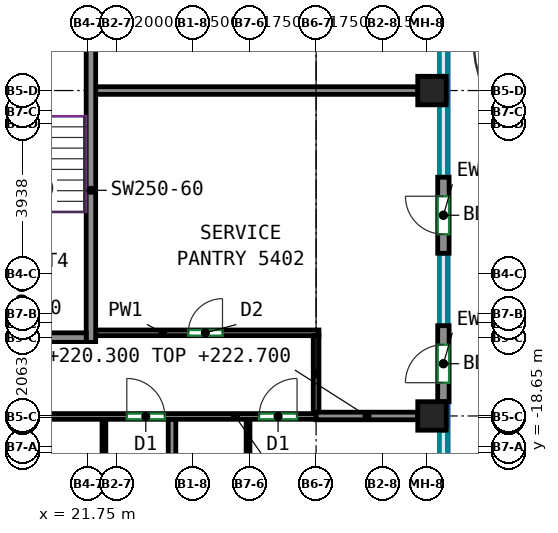
"""IFC4 building model, lengths in metres.
Left out: names, types, materials, properties, quantities, classifications, styles, units other than length and angle.
Written with IfcOpenShell. Run it as: python <this file> out.ifc"""

import sys

from ifc_helpers import new_model, si_unit, direction, frame, frame_2d, origin, origin_2d, place, context, subcontext, project, spatial, rectangle, extrude, source, transform, mapped, element, fill, save


model = new_model("IFC4")
c1 = context("Model", 3, precision=1e-05, world=origin(), true_north=direction((0.0, 1.0)))
c2 = subcontext(c1, "Body", "Model", "MODEL_VIEW")
j1 = project(units=[si_unit("LENGTHUNIT", "METRE"), si_unit("PLANEANGLEUNIT", "RADIAN")], contexts=[c1])
p1 = place(None, origin())
s1 = spatial("IfcSite", under=j1, at=p1, CompositionType="ELEMENT")
p2 = place(p1, origin())
s2 = spatial("IfcBuilding", under=s1, at=p2, CompositionType="ELEMENT")
p3 = place(p2, frame((0.0, 0.0, 220.3)))
s3 = spatial("IfcBuildingStorey", under=s2, at=p3, CompositionType="ELEMENT", Elevation=220.3)
m1 = source(origin(), c2, "Body", "SweptSolid", [
    extrude(rectangle(XDim=0.75, YDim=0.75, at=origin_2d()), origin(), (0.0, 0.0, 1.0), 3.0),
])
for number, where, z_axis, x_axis in (
    (1, (30.8, -17.688, 0.0), (0.0, 0.0, 1.0), (1.0, 0.0, 0.0)),
    (2, (30.8, -9.125, 0.0), (0.0, 0.0, 1.0), (1.0, 0.0, 0.0)),
):
    element("IfcColumn", number, at=place(p3, frame(where, z_axis=z_axis, x_axis=x_axis)), inside=s3, PredefinedType="COLUMN", context=c2, shape_type="MappedRepresentation", body=[
        mapped(m1, transform((0.0, 0.0, 0.0))),
    ])
m2 = source(origin(), c2, "Body", "SweptSolid", [
    extrude(rectangle(XDim=8.0, YDim=0.25, at=frame_2d((4.0, 0.0))), origin(), (0.0, 0.0, 1.0), 3.0),
])
p4 = place(p3, frame((21.825, -15.75, 0.0), z_axis=(0.0, 0.0, 1.0), x_axis=(0.0, 1.0, 0.0)))
e3 = element("IfcWall", 3, at=p4, inside=s3, PredefinedType="SHEAR", context=c2, shape_type="MappedRepresentation", body=[
    mapped(m2, transform((0.0, 0.0, 0.0))),
])
m3 = source(origin(), c2, "Body", "SweptSolid", [
    extrude(rectangle(XDim=3.7, YDim=0.25, at=frame_2d((1.85, 0.0))), origin(), (0.0, 0.0, 1.0), 3.0),
])
p5 = place(p3, frame((18.0, -15.625, 0.0), z_axis=(0.0, 0.0, 1.0), x_axis=(1.0, 0.0, 0.0)))
e4 = element("IfcWall", 4, at=p5, inside=s3, PredefinedType="SHEAR", context=c2, shape_type="MappedRepresentation", body=[
    mapped(m3, transform((0.0, 0.0, 0.0))),
])
m4 = source(origin(), c2, "Body", "SweptSolid", [
    extrude(rectangle(XDim=2.0, YDim=0.3, at=frame_2d((1.0, 0.0))), origin(), (0.0, 0.0, 1.0), 3.0),
])
p6 = place(p3, frame((31.1, -17.312, 0.0), z_axis=(0.0, 0.0, 1.0), x_axis=(0.0, 1.0, 0.0)))
e5 = element("IfcWall", 5, at=p6, inside=s3, PredefinedType="SOLIDWALL", context=c2, shape_type="MappedRepresentation", body=[
    mapped(m4, transform((0.0, 0.0, 0.0))),
])
p7 = place(p6, frame((0.5, 0.0, 0.0)))
e6 = element("IfcOpeningElement", 6, at=p7, cuts=e5, PredefinedType="OPENING", context=c2, shape_type="SweptSolid", body=[
    extrude(rectangle(XDim=1.0, YDim=2.1, at=frame_2d((0.5, 1.05))), frame((0.0, 0.16, 0.0), z_axis=(0.0, -1.0, 0.0), x_axis=(1.0, 0.0, 0.0)), (0.0, 0.0, 1.0), 0.32),
])
p8 = place(p3, frame((31.1, -13.406, 0.0), z_axis=(0.0, 0.0, 1.0), x_axis=(0.0, 1.0, 0.0)))
e7 = element("IfcWall", 7, at=p8, inside=s3, PredefinedType="SOLIDWALL", context=c2, shape_type="MappedRepresentation", body=[
    mapped(m4, transform((0.0, 0.0, 0.0))),
])
p9 = place(p8, frame((0.5, 0.0, 0.0)))
e8 = element("IfcOpeningElement", 8, at=p9, cuts=e7, PredefinedType="OPENING", context=c2, shape_type="SweptSolid", body=[
    extrude(rectangle(XDim=1.0, YDim=2.1, at=frame_2d((0.5, 1.05))), frame((0.0, 0.16, 0.0), z_axis=(0.0, -1.0, 0.0), x_axis=(1.0, 0.0, 0.0)), (0.0, 0.0, 1.0), 0.32),
])
p10 = place(p3, frame((20.667, -17.7, 0.0), z_axis=(0.0, 0.0, 1.0), x_axis=(1.0, 0.0, 0.0)))
e9 = element("IfcWall", 9, at=p10, inside=s3, PredefinedType="PARTITIONING", context=c2, shape_type="SweptSolid", body=[
    extrude(rectangle(XDim=7.083, YDim=0.15, at=frame_2d((3.542, 0.0))), origin(), (0.0, 0.0, 1.0), 2.4),
])
p11 = place(p10, frame((2.102, 0.0, 0.0)))
e10 = element("IfcOpeningElement", 10, at=p11, cuts=e9, PredefinedType="OPENING", context=c2, shape_type="SweptSolid", body=[
    extrude(rectangle(XDim=1.0, YDim=2.1, at=frame_2d((0.5, 1.05))), frame((0.0, 0.085, 0.0), z_axis=(0.0, -1.0, 0.0), x_axis=(1.0, 0.0, 0.0)), (0.0, 0.0, 1.0), 0.17),
])
p12 = place(p10, frame((5.582, 0.0, 0.0)))
e11 = element("IfcOpeningElement", 11, at=p12, cuts=e9, PredefinedType="OPENING", context=c2, shape_type="SweptSolid", body=[
    extrude(rectangle(XDim=1.0, YDim=2.1, at=frame_2d((0.5, 1.05))), frame((0.0, 0.085, 0.0), z_axis=(0.0, -1.0, 0.0), x_axis=(1.0, 0.0, 0.0)), (0.0, 0.0, 1.0), 0.17),
])
p13 = place(p3, frame((21.95, -15.5, 0.0), z_axis=(0.0, 0.0, 1.0), x_axis=(1.0, 0.0, 0.0)))
e12 = element("IfcWall", 12, at=p13, inside=s3, PredefinedType="PARTITIONING", context=c2, shape_type="SweptSolid", body=[
    extrude(rectangle(XDim=5.875, YDim=0.15, at=frame_2d((2.938, 0.0))), origin(), (0.0, 0.0, 1.0), 3.0),
])
p14 = place(p13, frame((2.437, 0.0, 0.0)))
e13 = element("IfcOpeningElement", 13, at=p14, cuts=e12, PredefinedType="OPENING", context=c2, shape_type="SweptSolid", body=[
    extrude(rectangle(XDim=0.9, YDim=2.1, at=frame_2d((0.45, 1.05))), frame((0.0, 0.085, 0.0), z_axis=(0.0, -1.0, 0.0), x_axis=(1.0, 0.0, 0.0)), (0.0, 0.0, 1.0), 0.17),
])
p15 = place(p3, frame((27.75, -17.598, 0.0), z_axis=(0.0, 0.0, 1.0), x_axis=(0.0, 1.0, 0.0)))
e14 = element("IfcWall", 14, at=p15, inside=s3, PredefinedType="PARTITIONING", context=c2, shape_type="SweptSolid", body=[
    extrude(rectangle(XDim=2.023, YDim=0.15, at=frame_2d((1.011, 0.0))), origin(), (0.0, 0.0, 1.0), 2.4),
])
p16 = place(p3, frame((22.167, -17.777, 0.0), z_axis=(0.0, 0.0, 1.0), x_axis=(0.0, -1.0, 0.0)))
e15 = element("IfcWall", 15, at=p16, inside=s3, PredefinedType="PARTITIONING", context=c2, shape_type="SweptSolid", body=[
    extrude(rectangle(XDim=3.075, YDim=0.1, at=frame_2d((1.538, 0.0))), origin(), (0.0, 0.0, 1.0), 3.0),
])
p17 = place(p16, frame((1.662, 0.0, 0.0)))
e16 = element("IfcOpeningElement", 16, at=p17, cuts=e15, PredefinedType="OPENING", context=c2, shape_type="SweptSolid", body=[
    extrude(rectangle(XDim=0.9, YDim=2.1, at=frame_2d((0.45, 1.05))), frame((0.0, 0.06, 0.0), z_axis=(0.0, -1.0, 0.0), x_axis=(1.0, 0.0, 0.0)), (0.0, 0.0, 1.0), 0.12),
])
p18 = place(p3, frame((23.959, -20.848, 0.0), z_axis=(0.0, 0.0, 1.0), x_axis=(0.0, 1.0, 0.0)))
e17 = element("IfcWall", 17, at=p18, inside=s3, PredefinedType="PARTITIONING", context=c2, shape_type="SweptSolid", body=[
    extrude(rectangle(XDim=3.071, YDim=0.2, at=frame_2d((1.535, 0.0))), origin(), (0.0, 0.0, 1.0), 3.0),
])
p19 = place(p3, frame((25.959, -17.777, 0.0), z_axis=(0.0, 0.0, 1.0), x_axis=(0.0, -1.0, 0.0)))
e18 = element("IfcWall", 18, at=p19, inside=s3, PredefinedType="PARTITIONING", context=c2, shape_type="SweptSolid", body=[
    extrude(rectangle(XDim=3.061, YDim=0.1, at=frame_2d((1.53, 0.0))), origin(), (0.0, 0.0, 1.0), 3.0),
])
p20 = place(p19, frame((1.857, 0.0, 0.0)))
e19 = element("IfcOpeningElement", 19, at=p20, cuts=e18, PredefinedType="OPENING", context=c2, shape_type="SweptSolid", body=[
    extrude(rectangle(XDim=0.9, YDim=2.1, at=frame_2d((0.45, 1.05))), frame((0.0, 0.06, 0.0), z_axis=(0.0, -1.0, 0.0), x_axis=(1.0, 0.0, 0.0)), (0.0, 0.0, 1.0), 0.12),
])
p21 = place(p3, frame((27.752, -17.688, 0.0), z_axis=(0.0, 0.0, 1.0), x_axis=(1.0, 0.0, 0.0)))
e20 = element("IfcWall", 20, at=p21, inside=s3, PredefinedType="PARTITIONING", context=c2, shape_type="SweptSolid", body=[
    extrude(rectangle(XDim=2.673, YDim=0.2, at=frame_2d((1.336, 0.0))), origin(), (0.0, 0.0, 1.0), 2.4),
])
p22 = place(p3, frame((21.95, -9.125, 0.0), z_axis=(0.0, 0.0, 1.0), x_axis=(1.0, 0.0, 0.0)))
e21 = element("IfcWall", 21, at=p22, inside=s3, PredefinedType="PARTITIONING", context=c2, shape_type="SweptSolid", body=[
    extrude(rectangle(XDim=8.475, YDim=0.2, at=frame_2d((4.238, 0.0))), origin(), (0.0, 0.0, 1.0), 3.0),
])
p23 = place(p7, origin())
e22 = element("IfcDoor", 22, at=p23, inside=s3, OperationType="SINGLE_SWING_LEFT", PredefinedType="DOOR", context=c2, shape_type="SweptSolid", body=[
    extrude(rectangle(XDim=1.0, YDim=2.1, at=frame_2d((0.5, 1.05))), frame((0.0, 0.025, 0.0), z_axis=(0.0, -1.0, 0.0), x_axis=(1.0, 0.0, 0.0)), (0.0, 0.0, 1.0), 0.05),
])
fill(e6, e22)
p24 = place(p9, origin())
e23 = element("IfcDoor", 23, at=p24, inside=s3, OperationType="SINGLE_SWING_RIGHT", PredefinedType="DOOR", context=c2, shape_type="SweptSolid", body=[
    extrude(rectangle(XDim=1.0, YDim=2.1, at=frame_2d((0.5, 1.05))), frame((0.0, 0.025, 0.0), z_axis=(0.0, -1.0, 0.0), x_axis=(1.0, 0.0, 0.0)), (0.0, 0.0, 1.0), 0.05),
])
fill(e8, e23)
p25 = place(p11, origin())
e24 = element("IfcDoor", 24, at=p25, inside=s3, OperationType="SINGLE_SWING_LEFT", PredefinedType="DOOR", context=c2, shape_type="SweptSolid", body=[
    extrude(rectangle(XDim=1.0, YDim=2.1, at=frame_2d((0.5, 1.05))), frame((0.0, 0.025, 0.0), z_axis=(0.0, -1.0, 0.0), x_axis=(1.0, 0.0, 0.0)), (0.0, 0.0, 1.0), 0.05),
])
fill(e10, e24)
p26 = place(p12, origin())
e25 = element("IfcDoor", 25, at=p26, inside=s3, OperationType="SINGLE_SWING_RIGHT", PredefinedType="DOOR", context=c2, shape_type="SweptSolid", body=[
    extrude(rectangle(XDim=1.0, YDim=2.1, at=frame_2d((0.5, 1.05))), frame((0.0, 0.025, 0.0), z_axis=(0.0, -1.0, 0.0), x_axis=(1.0, 0.0, 0.0)), (0.0, 0.0, 1.0), 0.05),
])
fill(e11, e25)
p27 = place(p14, origin())
e26 = element("IfcDoor", 26, at=p27, inside=s3, OperationType="SINGLE_SWING_RIGHT", PredefinedType="DOOR", context=c2, shape_type="SweptSolid", body=[
    extrude(rectangle(XDim=0.9, YDim=2.1, at=frame_2d((0.45, 1.05))), frame((0.0, 0.025, 0.0), z_axis=(0.0, -1.0, 0.0), x_axis=(1.0, 0.0, 0.0)), (0.0, 0.0, 1.0), 0.05),
])
fill(e13, e26)
save(model, sys.argv[1])
